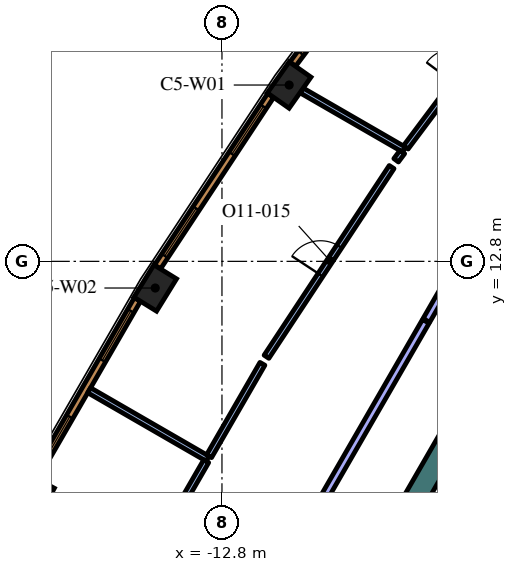
"""IFC4 building model, lengths in metres.
Left out: names, types, materials, properties, quantities, classifications, styles, units other than length and angle.
Written with IfcOpenShell. Run it as: python <this file> out.ifc"""

import sys

from ifc_helpers import new_model, si_unit, direction, frame, frame_2d, origin, origin_2d, place, context, subcontext, project, spatial, rectangle, extrude, element, fill, save


model = new_model("IFC4")
c1 = context("Model", 3, precision=1e-05, world=origin(), true_north=direction((0.0, 1.0)))
c2 = subcontext(c1, "Body", "Model", "MODEL_VIEW")
j1 = project(units=[si_unit("LENGTHUNIT", "METRE"), si_unit("PLANEANGLEUNIT", "RADIAN")], contexts=[c1])
p1 = place(None, origin())
s1 = spatial("IfcSite", under=j1, at=p1, CompositionType="ELEMENT")
p2 = place(p1, origin())
s2 = spatial("IfcBuilding", under=s1, at=p2, CompositionType="ELEMENT")
p3 = place(p2, frame((0.0, 0.0, 267.0)))
s3 = spatial("IfcBuildingStorey", under=s2, at=p3, CompositionType="ELEMENT", Elevation=267.0)
for number, where, z_axis, x_axis in (
    (1, (-11.032, 17.44, 0.0), (0.0, 0.0, 1.0), (-0.575, -0.818, 0.0)),
    (2, (-14.556, 12.098, 0.0), (0.0, 0.0, 1.0), (-0.526, -0.851, 0.0)),
    (3, (-17.756, 6.557, 0.0), (0.0, 0.0, 1.0), (-0.474, -0.881, 0.0)),
):
    element("IfcColumn", number, at=place(p3, frame(where, z_axis=z_axis, x_axis=x_axis)), inside=s3, PredefinedType="COLUMN", context=c2, shape_type="SweptSolid", body=[
        extrude(rectangle(XDim=1.0, YDim=0.7, at=origin_2d()), origin(), (0.0, 0.0, 1.0), 4.2),
    ])
p4 = place(p3, frame((-4.652, 11.842, 0.0), z_axis=(0.0, 0.0, 1.0), x_axis=(-0.500003640647, -0.866023301845, 0.0)))
e4 = element("IfcWall", 4, at=p4, inside=s3, PredefinedType="SOLIDWALL", context=c2, shape_type="SweptSolid", body=[
    extrude(rectangle(XDim=15.858, YDim=0.6, at=frame_2d((7.929, 0.0))), origin(), (0.0, 0.0, 1.0), 4.2),
])
p5 = place(p3, frame((-8.06, -1.311, 0.0), z_axis=(0.0, 0.0, 1.0), x_axis=(0.50000273126, 0.866023826885, 0.0)))
e5 = element("IfcWall", 5, at=p5, inside=s3, PredefinedType="SOLIDWALL", context=c2, shape_type="SweptSolid", body=[
    extrude(rectangle(XDim=10.33, YDim=0.25, at=frame_2d((5.165, 0.0))), origin(), (0.0, 0.0, 1.0), 4.2),
])
p6 = place(p3, frame((-8.007, 15.74, 0.0), z_axis=(0.0, 0.0, 1.0), x_axis=(-0.866044607523, 0.499966736674, 0.0)))
e6 = element("IfcWall", 6, at=p6, inside=s3, PredefinedType="PARTITIONING", context=c2, shape_type="SweptSolid", body=[
    extrude(rectangle(XDim=3.115, YDim=0.15, at=frame_2d((1.557, 0.0))), origin(), (0.0, 0.0, 1.0), 3.55),
])
p7 = place(p3, frame((-7.962, 15.8, 0.0), z_axis=(0.0, 0.0, 1.0), x_axis=(0.599528135832, 0.800353680785, 0.0)))
e7 = element("IfcWall", 7, at=p7, inside=s3, PredefinedType="PARTITIONING", context=c2, shape_type="SweptSolid", body=[
    extrude(rectangle(XDim=5.217, YDim=0.15, at=frame_2d((2.608, 0.0))), origin(), (0.0, 0.0, 1.0), 3.55),
])
p8 = place(p7, frame((2.116, 0.0, 0.0)))
e8 = element("IfcOpeningElement", 8, at=p8, cuts=e7, PredefinedType="OPENING", context=c2, shape_type="SweptSolid", body=[
    extrude(rectangle(XDim=0.9, YDim=2.1, at=frame_2d((0.45, 1.05))), frame((0.0, 0.085, 0.0), z_axis=(0.0, -1.0, 0.0), x_axis=(1.0, 0.0, 0.0)), (0.0, 0.0, 1.0), 0.17),
])
p9 = place(p3, frame((-13.177, 7.608, 0.0), z_axis=(0.0, 0.0, 1.0), x_axis=(-0.866018442252, 0.500012057535, 0.0)))
e9 = element("IfcWall", 9, at=p9, inside=s3, PredefinedType="PARTITIONING", context=c2, shape_type="SweptSolid", body=[
    extrude(rectangle(XDim=3.6, YDim=0.15, at=frame_2d((1.8, 0.0))), origin(), (0.0, 0.0, 1.0), 3.55),
])
p10 = place(p3, frame((-8.052, 15.679, 0.0), z_axis=(0.0, 0.0, 1.0), x_axis=(-0.599004157744, -0.800745914136, 0.0)))
e10 = element("IfcWall", 10, at=p10, inside=s3, PredefinedType="PARTITIONING", context=c2, shape_type="SweptSolid", body=[
    extrude(rectangle(XDim=0.275, YDim=0.15, at=frame_2d((0.137, 0.0))), origin(), (0.0, 0.0, 1.0), 3.55),
])
p11 = place(p3, frame((-11.628, 10.29, 0.0), z_axis=(0.0, 0.0, 1.0), x_axis=(0.55074607557, 0.834672846236, 0.0)))
e11 = element("IfcWall", 11, at=p11, inside=s3, PredefinedType="PARTITIONING", context=c2, shape_type="SweptSolid", body=[
    extrude(rectangle(XDim=5.979, YDim=0.15, at=frame_2d((2.99, 0.0))), origin(), (0.0, 0.0, 1.0), 3.55),
])
p12 = place(p11, frame((2.58, 0.0, 0.0)))
e12 = element("IfcOpeningElement", 12, at=p12, cuts=e11, PredefinedType="OPENING", context=c2, shape_type="SweptSolid", body=[
    extrude(rectangle(XDim=0.9, YDim=2.1, at=frame_2d((0.45, 1.05))), frame((0.0, 0.085, 0.0), z_axis=(0.0, -1.0, 0.0), x_axis=(1.0, 0.0, 0.0)), (0.0, 0.0, 1.0), 0.17),
])
p13 = place(p3, frame((-11.736, 10.104, 0.0), z_axis=(0.0, 0.0, 1.0), x_axis=(-0.500011000363, -0.866019052629, 0.0)))
e13 = element("IfcWall", 13, at=p13, inside=s3, PredefinedType="PARTITIONING", context=c2, shape_type="SweptSolid", body=[
    extrude(rectangle(XDim=2.808, YDim=0.15, at=frame_2d((1.404, 0.0))), origin(), (0.0, 0.0, 1.0), 3.55),
])
p14 = place(p3, frame((-13.214, 7.543, 0.0), z_axis=(0.0, 0.0, 1.0), x_axis=(-0.499927597274, -0.866067201483, 0.0)))
e14 = element("IfcWall", 14, at=p14, inside=s3, PredefinedType="PARTITIONING", context=c2, shape_type="SweptSolid", body=[
    extrude(rectangle(XDim=3.022, YDim=0.15, at=frame_2d((1.511, 0.0))), origin(), (0.0, 0.0, 1.0), 3.55),
])
p15 = place(p3, frame((-7.436, 11.221, 0.0), z_axis=(0.0, 0.0, 1.0), x_axis=(-0.49999894854, -0.866026010844, 0.0)))
e15 = element("IfcWall", 15, at=p15, inside=s3, PredefinedType="PARTITIONING", context=c2, shape_type="SweptSolid", body=[
    extrude(rectangle(XDim=12.0, YDim=0.2, at=frame_2d((6.0, 0.0))), origin(), (0.0, 0.0, 1.0), 3.55),
])
p16 = place(p15, frame((5.5, 0.0, 0.0)))
e16 = element("IfcOpeningElement", 16, at=p16, cuts=e15, PredefinedType="OPENING", context=c2, shape_type="SweptSolid", body=[
    extrude(rectangle(XDim=1.0, YDim=2.1, at=frame_2d((0.5, 1.05))), frame((0.0, 0.11, 0.0), z_axis=(0.0, -1.0, 0.0), x_axis=(1.0, 0.0, 0.0)), (0.0, 0.0, 1.0), 0.22),
])
p17 = place(p3, frame((-3.306, 18.374, 0.0), z_axis=(0.0, 0.0, 1.0), x_axis=(-0.499999798456, -0.866025520146, 0.0)))
e17 = element("IfcWall", 17, at=p17, inside=s3, PredefinedType="PARTITIONING", context=c2, shape_type="SweptSolid", body=[
    extrude(rectangle(XDim=8.229, YDim=0.2, at=frame_2d((4.115, 0.0))), origin(), (0.0, 0.0, 1.0), 3.55),
])
p18 = place(p3, frame((-7.692, 22.324, 0.0), z_axis=(0.0, 0.0, 1.0), x_axis=(-0.599559865294, -0.800329911929, 0.0)))
e18 = element("IfcWall", 18, at=p18, inside=s3, PredefinedType="SOLIDWALL", context=c2, shape_type="SweptSolid", body=[
    extrude(rectangle(XDim=5.415, YDim=0.19, at=frame_2d((2.708, 0.0))), origin(), (0.0, 0.0, 1.0), 3.95),
])
p19 = place(p18, frame((0.323, 0.0, 0.6)))
e19 = element("IfcOpeningElement", 19, at=p19, cuts=e18, PredefinedType="OPENING", context=c2, shape_type="SweptSolid", body=[
    extrude(rectangle(XDim=1.5, YDim=2.85, at=frame_2d((0.75, 1.425))), frame((0.0, 0.105, 0.0), z_axis=(0.0, -1.0, 0.0), x_axis=(1.0, 0.0, 0.0)), (0.0, 0.0, 1.0), 0.21),
])
p20 = place(p18, frame((3.558, 0.0, 0.6)))
e20 = element("IfcOpeningElement", 20, at=p20, cuts=e18, PredefinedType="OPENING", context=c2, shape_type="SweptSolid", body=[
    extrude(rectangle(XDim=1.5, YDim=2.85, at=frame_2d((0.75, 1.425))), frame((0.0, 0.105, 0.0), z_axis=(0.0, -1.0, 0.0), x_axis=(1.0, 0.0, 0.0)), (0.0, 0.0, 1.0), 0.21),
])
p21 = place(p3, frame((-11.518, 17.166, 0.0), z_axis=(0.0, 0.0, 1.0), x_axis=(-0.550744054781, -0.83467417962, 0.0)))
e21 = element("IfcWall", 21, at=p21, inside=s3, PredefinedType="SOLIDWALL", context=c2, shape_type="SweptSolid", body=[
    extrude(rectangle(XDim=5.406, YDim=0.19, at=frame_2d((2.703, 0.0))), origin(), (0.0, 0.0, 1.0), 3.95),
])
p22 = place(p21, frame((0.346, 0.0, 0.6)))
e22 = element("IfcOpeningElement", 22, at=p22, cuts=e21, PredefinedType="OPENING", context=c2, shape_type="SweptSolid", body=[
    extrude(rectangle(XDim=1.5, YDim=2.85, at=frame_2d((0.75, 1.425))), frame((0.0, 0.105, 0.0), z_axis=(0.0, -1.0, 0.0), x_axis=(1.0, 0.0, 0.0)), (0.0, 0.0, 1.0), 0.21),
])
p23 = place(p21, frame((3.559, 0.0, 0.6)))
e23 = element("IfcOpeningElement", 23, at=p23, cuts=e21, PredefinedType="OPENING", context=c2, shape_type="SweptSolid", body=[
    extrude(rectangle(XDim=1.5, YDim=2.85, at=frame_2d((0.75, 1.425))), frame((0.0, 0.105, 0.0), z_axis=(0.0, -1.0, 0.0), x_axis=(1.0, 0.0, 0.0)), (0.0, 0.0, 1.0), 0.21),
])
p24 = place(p3, frame((-15.025, 11.796, 0.0), z_axis=(0.0, 0.0, 1.0), x_axis=(-0.500024767483, -0.866011103799, 0.0)))
e24 = element("IfcWall", 24, at=p24, inside=s3, PredefinedType="SOLIDWALL", context=c2, shape_type="SweptSolid", body=[
    extrude(rectangle(XDim=5.406, YDim=0.19, at=frame_2d((2.703, 0.0))), origin(), (0.0, 0.0, 1.0), 3.95),
])
p25 = place(p24, frame((0.346, 0.0, 0.6)))
e25 = element("IfcOpeningElement", 25, at=p25, cuts=e24, PredefinedType="OPENING", context=c2, shape_type="SweptSolid", body=[
    extrude(rectangle(XDim=1.5, YDim=2.85, at=frame_2d((0.75, 1.425))), frame((0.0, 0.105, 0.0), z_axis=(0.0, -1.0, 0.0), x_axis=(1.0, 0.0, 0.0)), (0.0, 0.0, 1.0), 0.21),
])
p26 = place(p24, frame((3.559, 0.0, 0.6)))
e26 = element("IfcOpeningElement", 26, at=p26, cuts=e24, PredefinedType="OPENING", context=c2, shape_type="SweptSolid", body=[
    extrude(rectangle(XDim=1.5, YDim=2.85, at=frame_2d((0.75, 1.425))), frame((0.0, 0.105, 0.0), z_axis=(0.0, -1.0, 0.0), x_axis=(1.0, 0.0, 0.0)), (0.0, 0.0, 1.0), 0.21),
])
p27 = place(p12, origin())
e27 = element("IfcDoor", 27, at=p27, inside=s3, OperationType="SINGLE_SWING_RIGHT", PredefinedType="DOOR", context=c2, shape_type="SweptSolid", body=[
    extrude(rectangle(XDim=0.9, YDim=2.1, at=frame_2d((0.45, 1.05))), frame((0.0, 0.025, 0.0), z_axis=(0.0, -1.0, 0.0), x_axis=(1.0, 0.0, 0.0)), (0.0, 0.0, 1.0), 0.05),
])
fill(e12, e27)
p28 = place(p20, origin())
e28 = element("IfcWindow", 28, at=p28, inside=s3, PartitioningType="SINGLE_PANEL", PredefinedType="WINDOW", context=c2, shape_type="SweptSolid", body=[
    extrude(rectangle(XDim=1.5, YDim=2.85, at=frame_2d((0.75, 1.425))), frame((0.0, 0.045, 0.0), z_axis=(0.0, -1.0, 0.0), x_axis=(1.0, 0.0, 0.0)), (0.0, 0.0, 1.0), 0.06),
])
fill(e20, e28)
p29 = place(p22, origin())
e29 = element("IfcWindow", 29, at=p29, inside=s3, PartitioningType="SINGLE_PANEL", PredefinedType="WINDOW", context=c2, shape_type="SweptSolid", body=[
    extrude(rectangle(XDim=1.5, YDim=2.85, at=frame_2d((0.75, 1.425))), frame((0.0, 0.045, 0.0), z_axis=(0.0, -1.0, 0.0), x_axis=(1.0, 0.0, 0.0)), (0.0, 0.0, 1.0), 0.06),
])
fill(e22, e29)
p30 = place(p23, origin())
e30 = element("IfcWindow", 30, at=p30, inside=s3, PartitioningType="SINGLE_PANEL", PredefinedType="WINDOW", context=c2, shape_type="SweptSolid", body=[
    extrude(rectangle(XDim=1.5, YDim=2.85, at=frame_2d((0.75, 1.425))), frame((0.0, 0.045, 0.0), z_axis=(0.0, -1.0, 0.0), x_axis=(1.0, 0.0, 0.0)), (0.0, 0.0, 1.0), 0.06),
])
fill(e23, e30)
p31 = place(p25, origin())
e31 = element("IfcWindow", 31, at=p31, inside=s3, PartitioningType="SINGLE_PANEL", PredefinedType="WINDOW", context=c2, shape_type="SweptSolid", body=[
    extrude(rectangle(XDim=1.5, YDim=2.85, at=frame_2d((0.75, 1.425))), frame((0.0, 0.045, 0.0), z_axis=(0.0, -1.0, 0.0), x_axis=(1.0, 0.0, 0.0)), (0.0, 0.0, 1.0), 0.06),
])
fill(e25, e31)
p32 = place(p26, origin())
e32 = element("IfcWindow", 32, at=p32, inside=s3, PartitioningType="SINGLE_PANEL", PredefinedType="WINDOW", context=c2, shape_type="SweptSolid", body=[
    extrude(rectangle(XDim=1.5, YDim=2.85, at=frame_2d((0.75, 1.425))), frame((0.0, 0.045, 0.0), z_axis=(0.0, -1.0, 0.0), x_axis=(1.0, 0.0, 0.0)), (0.0, 0.0, 1.0), 0.06),
])
fill(e26, e32)
save(model, sys.argv[1])
